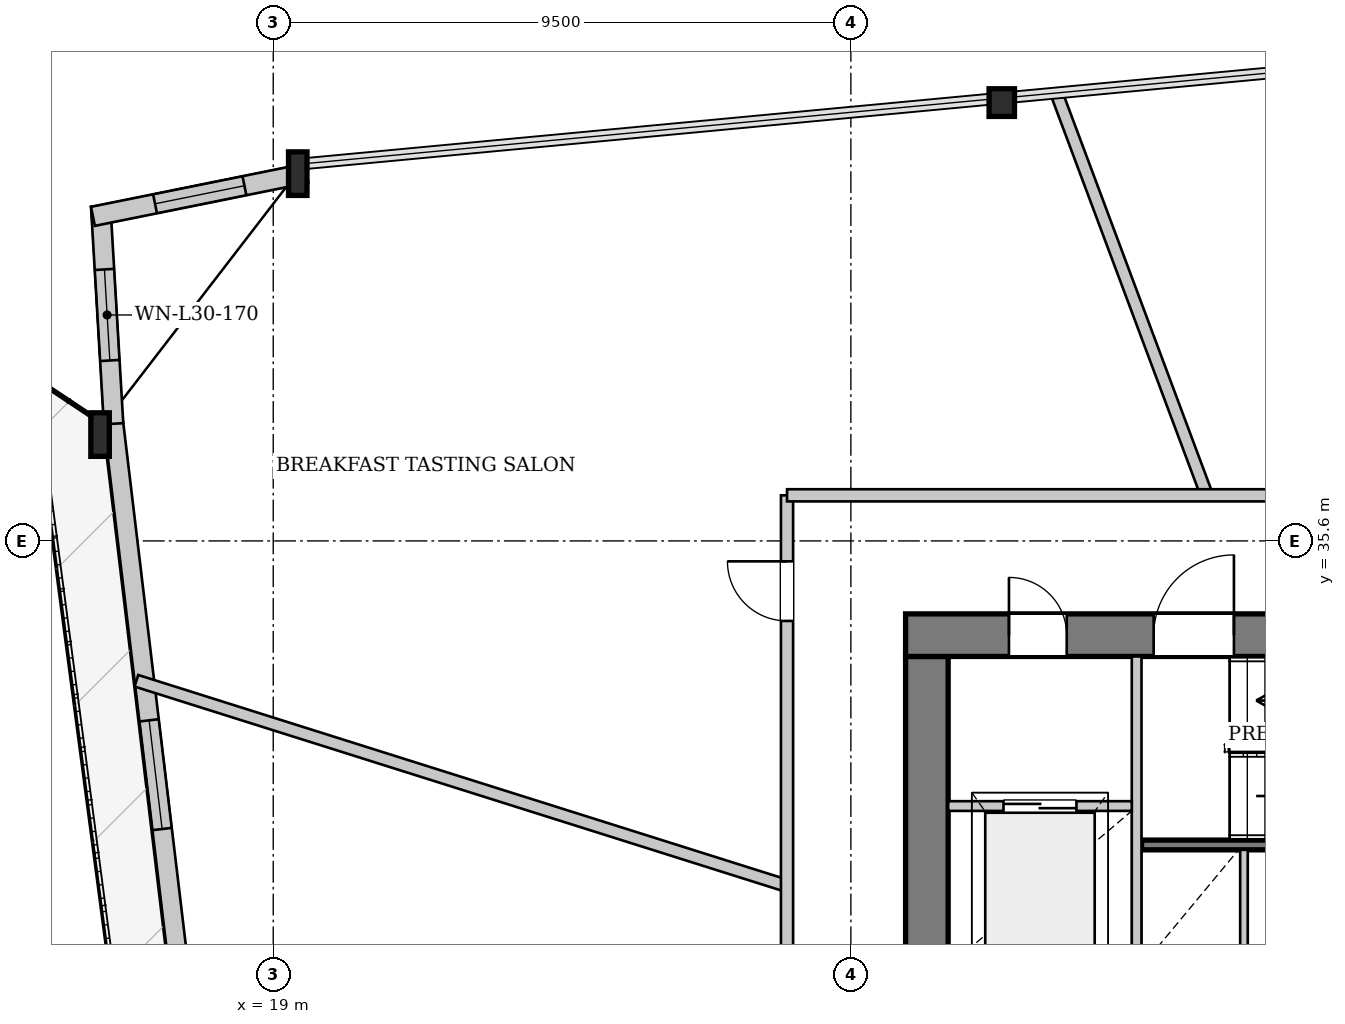
"""IFC4 building model, lengths in metres.
Left out: names, types, materials, properties, quantities, classifications, styles, units other than length and angle.
Written with IfcOpenShell. Run it as: python <this file> out.ifc"""

import sys

from ifc_helpers import new_model, si_unit, direction, frame, frame_2d, origin, origin_2d, place, context, subcontext, project, spatial, rectangle, i_section, extrude, source, transform, mapped, element, fill, save


model = new_model("IFC4")
c1 = context("Model", 3, precision=1e-05, world=origin(), true_north=direction((0.0, 1.0)))
c2 = subcontext(c1, "Body", "Model", "MODEL_VIEW")
j1 = project(units=[si_unit("LENGTHUNIT", "METRE"), si_unit("PLANEANGLEUNIT", "RADIAN")], contexts=[c1])
p1 = place(None, origin())
s1 = spatial("IfcSite", under=j1, at=p1, CompositionType="ELEMENT")
p2 = place(p1, origin())
s2 = spatial("IfcBuilding", under=s1, at=p2, CompositionType="ELEMENT")
p3 = place(p2, frame((0.0, 0.0, 116.35)))
s3 = spatial("IfcBuildingStorey", under=s2, at=p3, CompositionType="ELEMENT", Elevation=116.35)
m1 = source(origin(), c2, "Body", "SweptSolid", [
    extrude(i_section(OverallWidth=0.418, OverallDepth=0.455, WebThickness=0.038, FlangeThickness=0.059, at=origin_2d()), origin(), (0.0, 0.0, 1.0), 3.399),
])
p4 = place(p3, frame((31.11, 42.894, 0.0), z_axis=(-0.075203984266, -0.050351473707, 0.995896124024), x_axis=(0.556347454187, -0.830949763957, 0.0)))
e1 = element("IfcColumn", 1, at=p4, inside=s3, PredefinedType="COLUMN", context=c2, shape_type="MappedRepresentation", body=[
    mapped(m1, transform((0.0, 0.0, 0.0), x_axis=(1.0, 0.0, 0.0), y_axis=(0.0, 1.0, 0.0), z_axis=(0.0, 0.0, 1.0), scale=1.0)),
])
m2 = source(origin(), c2, "Body", "SweptSolid", [
    extrude(i_section(OverallWidth=0.304, OverallDepth=0.716, WebThickness=0.021, FlangeThickness=0.04, at=origin_2d()), origin(), (0.0, 0.0, 1.0), 3.408),
])
p5 = place(p3, frame((19.515, 41.804, 0.0), z_axis=(-0.065686123585, -0.096416054903, 0.99317132335), x_axis=(0.826435126374, -0.563031954595, 0.0)))
e2 = element("IfcColumn", 2, at=p5, inside=s3, PredefinedType="COLUMN", context=c2, shape_type="MappedRepresentation", body=[
    mapped(m2, transform((0.0, 0.0, 0.0), x_axis=(1.0, 0.0, 0.0), y_axis=(0.0, 1.0, 0.0), z_axis=(0.0, 0.0, 1.0), scale=1.0)),
])
m3 = source(origin(), c2, "Body", "SweptSolid", [
    extrude(i_section(OverallWidth=0.304, OverallDepth=0.716, WebThickness=0.021, FlangeThickness=0.04, at=origin_2d()), origin(), (0.0, 0.0, 1.0), 3.404),
])
p6 = place(p3, frame((16.214, 37.518, 0.0), z_axis=(-0.03650577529, -0.099117841751, 0.994405843616), x_axis=(0.938377890114, -0.345610959528, 0.0)))
e3 = element("IfcColumn", 3, at=p6, inside=s3, PredefinedType="COLUMN", context=c2, shape_type="MappedRepresentation", body=[
    mapped(m3, transform((0.0, 0.0, 0.0), x_axis=(1.0, 0.0, 0.0), y_axis=(0.0, 1.0, 0.0), z_axis=(0.0, 0.0, 1.0), scale=1.0)),
])
p7 = place(p3, frame((18.532, 19.504, 0.0), z_axis=(0.0, 0.0, 1.0), x_axis=(-0.118889186276, 0.992907529122, 0.0)))
e4 = element("IfcWall", 4, at=p7, inside=s3, PredefinedType="SOLIDWALL", context=c2, shape_type="SweptSolid", body=[
    extrude(rectangle(XDim=18.161, YDim=0.32, at=frame_2d((9.081, 0.0))), origin(), (0.0, 0.0, 1.0), 2.692),
])
p8 = place(p7, frame((5.262, 0.0, 0.0)))
e5 = element("IfcOpeningElement", 5, at=p8, cuts=e4, PredefinedType="OPENING", context=c2, shape_type="SweptSolid", body=[
    extrude(rectangle(XDim=1.1, YDim=2.3, at=frame_2d((0.55, 1.15))), frame((0.0, 0.17, 0.0), z_axis=(0.0, -1.0, 0.0), x_axis=(1.0, 0.0, 0.0)), (0.0, 0.0, 1.0), 0.34),
])
p9 = place(p7, frame((11.439, 0.0, 0.372)))
e6 = element("IfcOpeningElement", 6, at=p9, cuts=e4, PredefinedType="OPENING", context=c2, shape_type="SweptSolid", body=[
    extrude(rectangle(XDim=1.8, YDim=2.2, at=frame_2d((0.9, 1.1))), frame((0.0, 0.17, 0.0), z_axis=(0.0, -1.0, 0.0), x_axis=(1.0, 0.0, 0.0)), (0.0, 0.0, 1.0), 0.34),
])
p10 = place(p3, frame((16.374, 37.527, 0.0), z_axis=(0.0, 0.0, 1.0), x_axis=(-0.059001592377, 0.998257888572, 0.0)))
e7 = element("IfcWall", 7, at=p10, inside=s3, PredefinedType="SOLIDWALL", context=c2, shape_type="SweptSolid", body=[
    extrude(rectangle(XDim=3.583, YDim=0.32, at=frame_2d((1.792, 0.0))), origin(), (0.0, 0.0, 1.0), 2.692),
])
p11 = place(p10, frame((1.042, 0.0, 0.272)))
e8 = element("IfcOpeningElement", 8, at=p11, cuts=e7, PredefinedType="OPENING", context=c2, shape_type="SweptSolid", body=[
    extrude(rectangle(XDim=1.5, YDim=2.3, at=frame_2d((0.75, 1.15))), frame((0.0, 0.17, 0.0), z_axis=(0.0, -1.0, 0.0), x_axis=(1.0, 0.0, 0.0)), (0.0, 0.0, 1.0), 0.34),
])
p12 = place(p3, frame((16.035, 40.938, 0.0), z_axis=(0.0, 0.0, 1.0), x_axis=(0.98019093966, 0.198054845457, 0.0)))
e9 = element("IfcWall", 9, at=p12, inside=s3, PredefinedType="SOLIDWALL", context=c2, shape_type="SweptSolid", body=[
    extrude(rectangle(XDim=3.583, YDim=0.32, at=frame_2d((1.792, 0.0))), origin(), (0.0, 0.0, 1.0), 2.692),
])
p13 = place(p12, frame((1.042, 0.0, 0.272)))
e10 = element("IfcOpeningElement", 10, at=p13, cuts=e9, PredefinedType="OPENING", context=c2, shape_type="SweptSolid", body=[
    extrude(rectangle(XDim=1.5, YDim=2.3, at=frame_2d((0.75, 1.15))), frame((0.0, 0.17, 0.0), z_axis=(0.0, -1.0, 0.0), x_axis=(1.0, 0.0, 0.0)), (0.0, 0.0, 1.0), 0.34),
])
p14 = place(p3, frame((29.75, 19.5, 0.0), z_axis=(0.0, 0.0, 1.0), x_axis=(0.0, 1.0, 0.0)))
e11 = element("IfcWall", 11, at=p14, inside=s3, PredefinedType="SHEAR", context=c2, shape_type="SweptSolid", body=[
    extrude(rectangle(XDim=14.2, YDim=0.7, at=frame_2d((7.1, 0.0))), origin(), (0.0, 0.0, 1.0), 3.3),
])
p15 = place(p14, frame((7.42, 0.0, 0.0)))
e12 = element("IfcOpeningElement", 12, at=p15, cuts=e11, PredefinedType="OPENING", context=c2, shape_type="SweptSolid", body=[
    extrude(rectangle(XDim=1.6, YDim=2.2, at=frame_2d((0.8, 1.1))), frame((0.0, 0.36, 0.0), z_axis=(0.0, -1.0, 0.0), x_axis=(1.0, 0.0, 0.0)), (0.0, 0.0, 1.0), 0.72),
])
p16 = place(p3, frame((29.4, 34.05, 0.0), z_axis=(0.0, 0.0, 1.0), x_axis=(1.0, 0.0, 0.0)))
e13 = element("IfcWall", 13, at=p16, inside=s3, PredefinedType="SHEAR", context=c2, shape_type="SweptSolid", body=[
    extrude(rectangle(XDim=17.2, YDim=0.7, at=frame_2d((8.6, 0.0))), origin(), (0.0, 0.0, 1.0), 3.3),
])
p17 = place(p16, frame((1.7, 0.0, 0.0)))
e14 = element("IfcOpeningElement", 14, at=p17, cuts=e13, PredefinedType="OPENING", context=c2, shape_type="SweptSolid", body=[
    extrude(rectangle(XDim=0.95, YDim=2.1, at=frame_2d((0.475, 1.05))), frame((0.0, 0.36, 0.0), z_axis=(0.0, -1.0, 0.0), x_axis=(1.0, 0.0, 0.0)), (0.0, 0.0, 1.0), 0.72),
])
p18 = place(p16, frame((4.08, 0.0, 0.0)))
e15 = element("IfcOpeningElement", 15, at=p18, cuts=e13, PredefinedType="OPENING", context=c2, shape_type="SweptSolid", body=[
    extrude(rectangle(XDim=1.32, YDim=2.2, at=frame_2d((0.66, 1.1))), frame((0.0, 0.36, 0.0), z_axis=(0.0, -1.0, 0.0), x_axis=(1.0, 0.0, 0.0)), (0.0, 0.0, 1.0), 0.72),
])
p19 = place(p16, frame((15.15, 0.0, 0.0)))
e16 = element("IfcOpeningElement", 16, at=p19, cuts=e13, PredefinedType="OPENING", context=c2, shape_type="SweptSolid", body=[
    extrude(rectangle(XDim=0.95, YDim=2.1, at=frame_2d((0.475, 1.05))), frame((0.0, 0.36, 0.0), z_axis=(0.0, -1.0, 0.0), x_axis=(1.0, 0.0, 0.0)), (0.0, 0.0, 1.0), 0.72),
])
p20 = place(p3, frame((33.28, 30.6, 0.0), z_axis=(0.0, 0.0, 1.0), x_axis=(1.0, 0.0, 0.0)))
e17 = element("IfcWall", 17, at=p20, inside=s3, PredefinedType="PARTITIONING", context=c2, shape_type="SweptSolid", body=[
    extrude(rectangle(XDim=7.3, YDim=0.16, at=frame_2d((3.65, 0.0))), origin(), (0.0, 0.0, 1.0), 3.3),
])
p21 = place(p3, frame((33.2, 28.44, 0.0), z_axis=(0.0, 0.0, 1.0), x_axis=(0.0, 1.0, 0.0)))
e18 = element("IfcWall", 18, at=p21, inside=s3, PredefinedType="PARTITIONING", context=c2, shape_type="SweptSolid", body=[
    extrude(rectangle(XDim=5.26, YDim=0.16, at=frame_2d((2.63, 0.0))), origin(), (0.0, 0.0, 1.0), 3.3),
])
p22 = place(p3, frame((30.1, 31.24, 0.0), z_axis=(0.0, 0.0, 1.0), x_axis=(1.0, 0.0, 0.0)))
e19 = element("IfcWall", 19, at=p22, inside=s3, PredefinedType="PARTITIONING", context=c2, shape_type="SweptSolid", body=[
    extrude(rectangle(XDim=3.02, YDim=0.16, at=frame_2d((1.51, 0.0))), origin(), (0.0, 0.0, 1.0), 3.3),
])
p23 = place(p22, frame((0.91, 0.0, 0.0)))
e20 = element("IfcOpeningElement", 20, at=p23, cuts=e19, PredefinedType="OPENING", context=c2, shape_type="SweptSolid", body=[
    extrude(rectangle(XDim=1.2, YDim=2.2, at=frame_2d((0.6, 1.1))), frame((0.0, 0.09, 0.0), z_axis=(0.0, -1.0, 0.0), x_axis=(1.0, 0.0, 0.0)), (0.0, 0.0, 1.0), 0.18),
])
p24 = place(p3, frame((34.965, 28.6, 0.0), z_axis=(0.0, 0.0, 1.0), x_axis=(0.0, 1.0, 0.0)))
e21 = element("IfcWall", 21, at=p24, inside=s3, PredefinedType="PARTITIONING", context=c2, shape_type="SweptSolid", body=[
    extrude(rectangle(XDim=1.92, YDim=0.125, at=frame_2d((0.96, 0.0))), origin(), (0.0, 0.0, 1.0), 3.3),
])
p25 = place(p3, frame((34.354, 36.35, 0.0), z_axis=(0.0, 0.0, 1.0), x_axis=(-0.350202617088, 0.936673970485, 0.0)))
e22 = element("IfcWall", 22, at=p25, inside=s3, PredefinedType="PARTITIONING", context=c2, shape_type="SweptSolid", body=[
    extrude(rectangle(XDim=7.033, YDim=0.2, at=frame_2d((3.516, 0.0))), origin(), (0.0, 0.0, 1.0), 3.3),
])
p26 = place(p3, frame((27.45, 29.927, 0.0), z_axis=(0.0, 0.0, 1.0), x_axis=(-0.953718389909, 0.300701235031, 0.0)))
e23 = element("IfcWall", 23, at=p26, inside=s3, PredefinedType="PARTITIONING", context=c2, shape_type="SweptSolid", body=[
    extrude(rectangle(XDim=11.22, YDim=0.2, at=frame_2d((5.61, 0.0))), origin(), (0.0, 0.0, 1.0), 3.3),
])
p27 = place(p3, frame((27.45, 16.85, 0.0), z_axis=(0.0, 0.0, 1.0), x_axis=(0.0, 1.0, 0.0)))
e24 = element("IfcWall", 24, at=p27, inside=s3, PredefinedType="PARTITIONING", context=c2, shape_type="SweptSolid", body=[
    extrude(rectangle(XDim=19.5, YDim=0.2, at=frame_2d((9.75, 0.0))), origin(), (0.0, 0.0, 1.0), 3.3),
])
p28 = place(p27, frame((17.434, 0.0, 0.0)))
e25 = element("IfcOpeningElement", 25, at=p28, cuts=e24, PredefinedType="OPENING", context=c2, shape_type="SweptSolid", body=[
    extrude(rectangle(XDim=0.98, YDim=2.15, at=frame_2d((0.49, 1.075))), frame((0.0, 0.11, 0.0), z_axis=(0.0, -1.0, 0.0), x_axis=(1.0, 0.0, 0.0)), (0.0, 0.0, 1.0), 0.22),
])
p29 = place(p27, frame((7.437, 0.0, 0.0)))
e26 = element("IfcOpeningElement", 26, at=p29, cuts=e24, PredefinedType="OPENING", context=c2, shape_type="SweptSolid", body=[
    extrude(rectangle(XDim=0.98, YDim=2.15, at=frame_2d((0.49, 1.075))), frame((0.0, 0.11, 0.0), z_axis=(0.0, -1.0, 0.0), x_axis=(1.0, 0.0, 0.0)), (0.0, 0.0, 1.0), 0.22),
])
p30 = place(p27, frame((0.3, 0.0, 0.0)))
e27 = element("IfcOpeningElement", 27, at=p30, cuts=e24, PredefinedType="OPENING", context=c2, shape_type="SweptSolid", body=[
    extrude(rectangle(XDim=0.98, YDim=2.15, at=frame_2d((0.49, 1.075))), frame((0.0, 0.11, 0.0), z_axis=(0.0, -1.0, 0.0), x_axis=(1.0, 0.0, 0.0)), (0.0, 0.0, 1.0), 0.22),
])
p31 = place(p3, frame((27.45, 36.35, 0.0), z_axis=(0.0, 0.0, 1.0), x_axis=(1.0, 0.0, 0.0)))
e28 = element("IfcWall", 28, at=p31, inside=s3, PredefinedType="PARTITIONING", context=c2, shape_type="SweptSolid", body=[
    extrude(rectangle(XDim=21.1, YDim=0.2, at=frame_2d((10.55, 0.0))), origin(), (0.0, 0.0, 1.0), 3.3),
])
p32 = place(p31, frame((19.82, 0.0, 0.0)))
e29 = element("IfcOpeningElement", 29, at=p32, cuts=e28, PredefinedType="OPENING", context=c2, shape_type="SweptSolid", body=[
    extrude(rectangle(XDim=0.98, YDim=2.15, at=frame_2d((0.49, 1.075))), frame((0.0, 0.11, 0.0), z_axis=(0.0, -1.0, 0.0), x_axis=(1.0, 0.0, 0.0)), (0.0, 0.0, 1.0), 0.22),
])
p33 = place(p31, frame((10.454, 0.0, 0.0)))
e30 = element("IfcOpeningElement", 30, at=p33, cuts=e28, PredefinedType="OPENING", context=c2, shape_type="SweptSolid", body=[
    extrude(rectangle(XDim=0.98, YDim=2.15, at=frame_2d((0.49, 1.075))), frame((0.0, 0.11, 0.0), z_axis=(0.0, -1.0, 0.0), x_axis=(1.0, 0.0, 0.0)), (0.0, 0.0, 1.0), 0.22),
])
m4 = source(origin(), c2, "Body", "SweptSolid", [
    extrude(rectangle(XDim=1.8, YDim=2.2, at=frame_2d((0.9, 1.1))), frame((0.0, 0.03, 0.0), z_axis=(0.0, -1.0, 0.0), x_axis=(1.0, 0.0, 0.0)), (0.0, 0.0, 1.0), 0.06),
])
p34 = place(p9, origin())
e31 = element("IfcWindow", 31, at=p34, inside=s3, PartitioningType="SINGLE_PANEL", PredefinedType="WINDOW", context=c2, shape_type="MappedRepresentation", body=[
    mapped(m4, transform((0.0, 0.0, 0.0), x_axis=(1.0, 0.0, 0.0), y_axis=(0.0, 1.0, 0.0), z_axis=(0.0, 0.0, 1.0), scale=1.0)),
])
fill(e6, e31)
m5 = source(origin(), c2, "Body", "SweptSolid", [
    extrude(rectangle(XDim=1.5, YDim=2.3, at=frame_2d((0.75, 1.15))), frame((0.0, 0.03, 0.0), z_axis=(0.0, -1.0, 0.0), x_axis=(1.0, 0.0, 0.0)), (0.0, 0.0, 1.0), 0.06),
])
p35 = place(p11, origin())
e32 = element("IfcWindow", 32, at=p35, inside=s3, PartitioningType="SINGLE_PANEL", PredefinedType="WINDOW", context=c2, shape_type="MappedRepresentation", body=[
    mapped(m5, transform((0.0, 0.0, 0.0), x_axis=(1.0, 0.0, 0.0), y_axis=(0.0, 1.0, 0.0), z_axis=(0.0, 0.0, 1.0), scale=1.0)),
])
fill(e8, e32)
p36 = place(p13, origin())
e33 = element("IfcWindow", 33, at=p36, inside=s3, PartitioningType="SINGLE_PANEL", PredefinedType="WINDOW", context=c2, shape_type="MappedRepresentation", body=[
    mapped(m5, transform((0.0, 0.0, 0.0), x_axis=(1.0, 0.0, 0.0), y_axis=(0.0, 1.0, 0.0), z_axis=(0.0, 0.0, 1.0), scale=1.0)),
])
fill(e10, e33)
m6 = source(origin(), c2, "Body", "SweptSolid", [
    extrude(rectangle(XDim=0.95, YDim=2.1, at=frame_2d((0.475, 1.05))), frame((0.0, 0.025, 0.0), z_axis=(0.0, -1.0, 0.0), x_axis=(1.0, 0.0, 0.0)), (0.0, 0.0, 1.0), 0.05),
])
p37 = place(p17, origin())
e34 = element("IfcDoor", 34, at=p37, inside=s3, OperationType="SINGLE_SWING_LEFT", PredefinedType="DOOR", context=c2, shape_type="MappedRepresentation", body=[
    mapped(m6, transform((0.0, 0.0, 0.0), x_axis=(1.0, 0.0, 0.0), y_axis=(0.0, 1.0, 0.0), z_axis=(0.0, 0.0, 1.0), scale=1.0)),
])
fill(e14, e34)
m7 = source(origin(), c2, "Body", "SweptSolid", [
    extrude(rectangle(XDim=1.32, YDim=2.2, at=frame_2d((0.66, 1.1))), frame((0.0, 0.025, 0.0), z_axis=(0.0, -1.0, 0.0), x_axis=(1.0, 0.0, 0.0)), (0.0, 0.0, 1.0), 0.05),
])
p38 = place(p18, origin())
e35 = element("IfcDoor", 35, at=p38, inside=s3, OperationType="SINGLE_SWING_RIGHT", PredefinedType="DOOR", context=c2, shape_type="MappedRepresentation", body=[
    mapped(m7, transform((0.0, 0.0, 0.0), x_axis=(1.0, 0.0, 0.0), y_axis=(0.0, 1.0, 0.0), z_axis=(0.0, 0.0, 1.0), scale=1.0)),
])
fill(e15, e35)
m8 = source(origin(), c2, "Body", "SweptSolid", [
    extrude(rectangle(XDim=1.2, YDim=2.2, at=frame_2d((0.6, 1.1))), frame((0.0, 0.025, 0.0), z_axis=(0.0, -1.0, 0.0), x_axis=(1.0, 0.0, 0.0)), (0.0, 0.0, 1.0), 0.05),
])
p39 = place(p23, origin())
e36 = element("IfcDoor", 36, at=p39, inside=s3, OperationType="DOUBLE_DOOR_SLIDING", PredefinedType="DOOR", context=c2, shape_type="MappedRepresentation", body=[
    mapped(m8, transform((0.0, 0.0, 0.0), x_axis=(1.0, 0.0, 0.0), y_axis=(0.0, 1.0, 0.0), z_axis=(0.0, 0.0, 1.0), scale=1.0)),
])
fill(e20, e36)
m9 = source(origin(), c2, "Body", "SweptSolid", [
    extrude(rectangle(XDim=0.98, YDim=2.15, at=frame_2d((0.49, 1.075))), frame((0.0, 0.025, 0.0), z_axis=(0.0, -1.0, 0.0), x_axis=(1.0, 0.0, 0.0)), (0.0, 0.0, 1.0), 0.05),
])
p40 = place(p28, origin())
e37 = element("IfcDoor", 37, at=p40, inside=s3, OperationType="SINGLE_SWING_RIGHT", PredefinedType="DOOR", context=c2, shape_type="MappedRepresentation", body=[
    mapped(m9, transform((0.0, 0.0, 0.0), x_axis=(1.0, 0.0, 0.0), y_axis=(0.0, 1.0, 0.0), z_axis=(0.0, 0.0, 1.0), scale=1.0)),
])
fill(e25, e37)
save(model, sys.argv[1])
